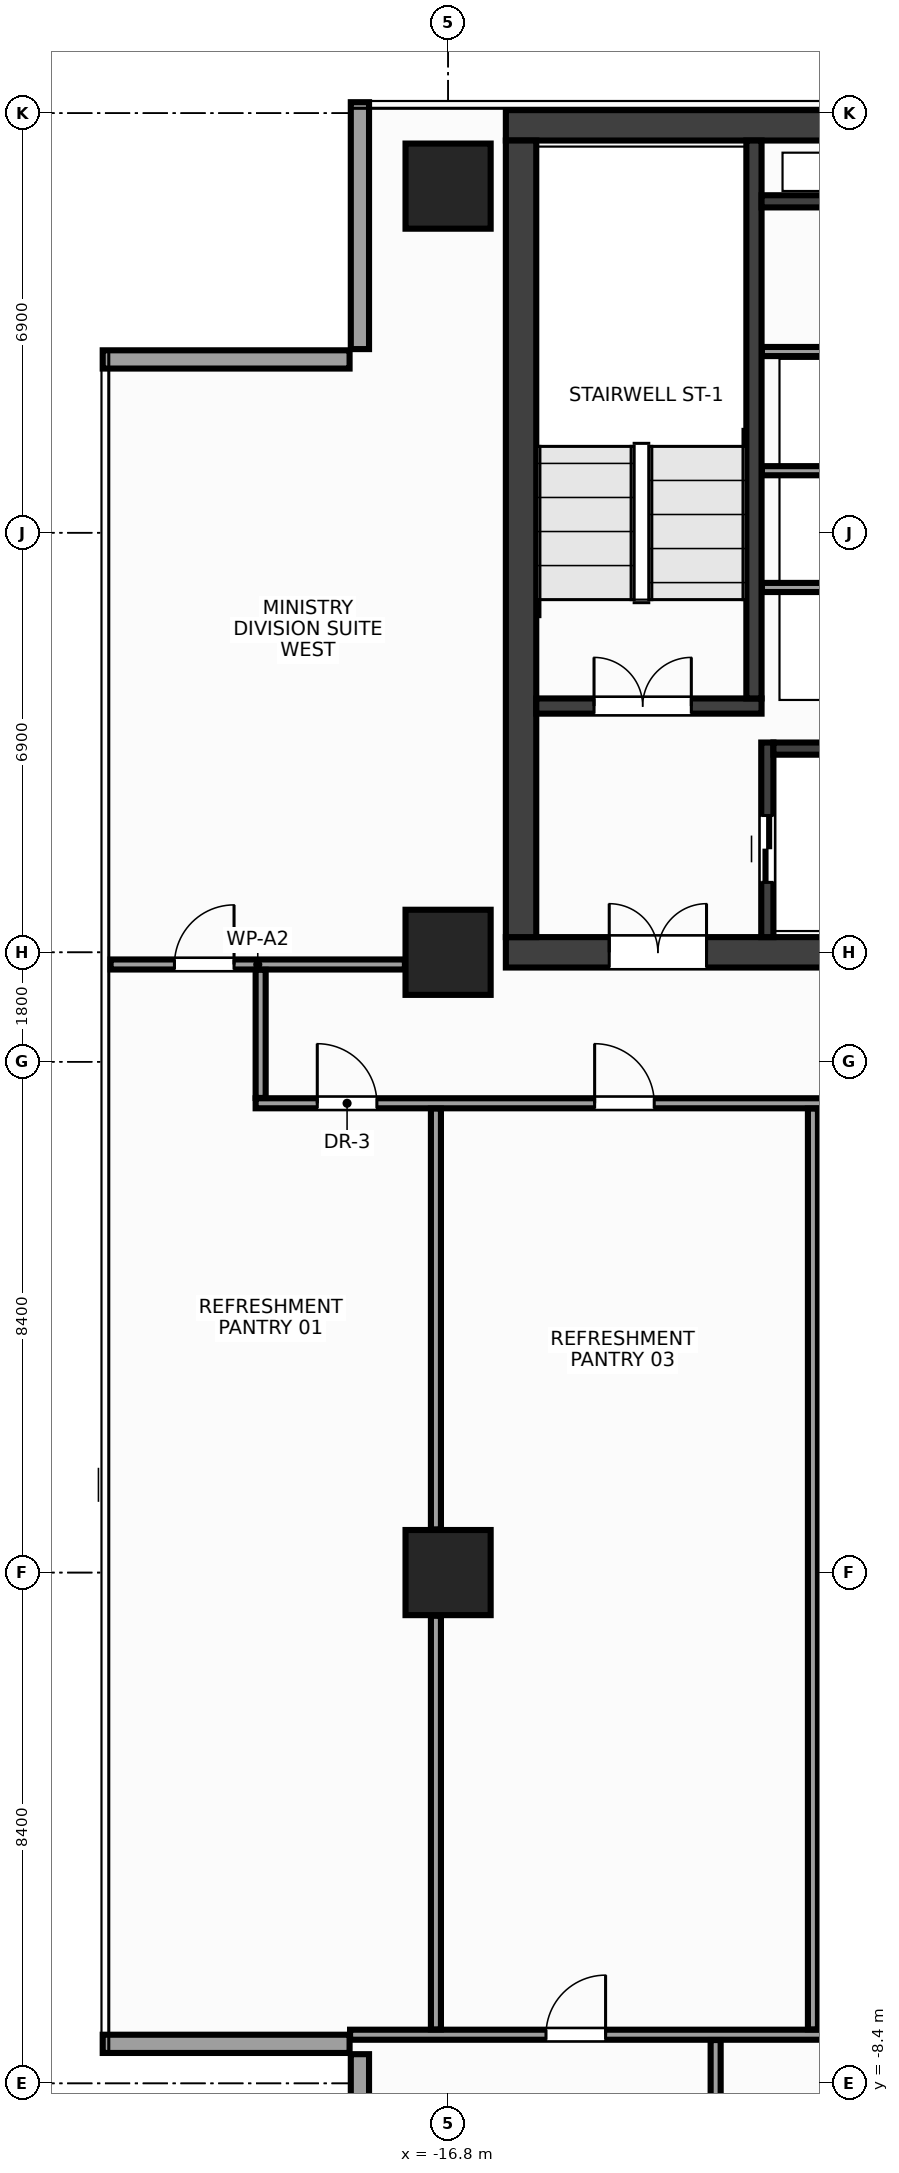
"""IFC4 building model, lengths in metres.
Left out: names, types, materials, properties, quantities, classifications, styles, units other than length and angle.
Written with IfcOpenShell. Run it as: python <this file> out.ifc"""

import sys

from ifc_helpers import new_model, si_unit, direction, frame, frame_2d, origin, origin_2d, place, context, subcontext, project, spatial, rectangle, extrude, source, transform, mapped, element, fill, save


model = new_model("IFC4")
c1 = context("Model", 3, precision=1e-05, world=origin(), true_north=direction((0.0, 1.0)))
c2 = subcontext(c1, "Body", "Model", "MODEL_VIEW")
j1 = project(units=[si_unit("LENGTHUNIT", "METRE"), si_unit("PLANEANGLEUNIT", "RADIAN")], contexts=[c1])
p1 = place(None, origin())
s1 = spatial("IfcSite", under=j1, at=p1, CompositionType="ELEMENT")
p2 = place(p1, origin())
s2 = spatial("IfcBuilding", under=s1, at=p2, CompositionType="ELEMENT")
p3 = place(p2, frame((0.0, 0.0, 261.2)))
s3 = spatial("IfcBuildingStorey", under=s2, at=p3, CompositionType="ELEMENT", Elevation=261.2)
m1 = source(origin(), c2, "Body", "SweptSolid", [
    extrude(rectangle(XDim=31.7, YDim=0.5, at=frame_2d((15.85, 0.0))), origin(), (0.0, 0.0, 1.0), 3.6),
])
p4 = place(p3, frame((-15.85, 23.8, 0.0), z_axis=(0.0, 0.0, 1.0), x_axis=(1.0, 0.0, 0.0)))
e1 = element("IfcWall", 1, at=p4, inside=s3, PredefinedType="SHEAR", context=c2, shape_type="MappedRepresentation", body=[
    mapped(m1, transform((0.0, 0.0, 0.0), x_axis=(1.0, 0.0, 0.0), y_axis=(0.0, 1.0, 0.0), z_axis=(0.0, 0.0, 1.0), scale=1.0)),
])
p5 = place(p3, frame((-15.85, 10.2, 0.0), z_axis=(0.0, 0.0, 1.0), x_axis=(1.0, 0.0, 0.0)))
e2 = element("IfcWall", 2, at=p5, inside=s3, PredefinedType="SHEAR", context=c2, shape_type="MappedRepresentation", body=[
    mapped(m1, transform((0.0, 0.0, 0.0), x_axis=(1.0, 0.0, 0.0), y_axis=(0.0, 1.0, 0.0), z_axis=(0.0, 0.0, 1.0), scale=1.0)),
])
p6 = place(p5, frame((1.7, 0.0, 0.0)))
e3 = element("IfcOpeningElement", 3, at=p6, cuts=e2, PredefinedType="OPENING", context=c2, shape_type="SweptSolid", body=[
    extrude(rectangle(XDim=1.6, YDim=2.15, at=frame_2d((0.8, 1.075))), frame((0.0, 0.262, 0.0), z_axis=(0.0, -1.0, 0.0), x_axis=(1.0, 0.0, 0.0)), (0.0, 0.0, 1.0), 0.524),
])
p7 = place(p5, frame((28.4, 0.0, 0.0)))
e4 = element("IfcOpeningElement", 4, at=p7, cuts=e2, PredefinedType="OPENING", context=c2, shape_type="SweptSolid", body=[
    extrude(rectangle(XDim=1.6, YDim=2.15, at=frame_2d((0.8, 1.075))), frame((0.0, 0.262, 0.0), z_axis=(0.0, -1.0, 0.0), x_axis=(1.0, 0.0, 0.0)), (0.0, 0.0, 1.0), 0.524),
])
p8 = place(p5, frame((15.1, 0.0, 0.0)))
e5 = element("IfcOpeningElement", 5, at=p8, cuts=e2, PredefinedType="OPENING", context=c2, shape_type="SweptSolid", body=[
    extrude(rectangle(XDim=1.5, YDim=2.2, at=frame_2d((0.75, 1.1))), frame((0.0, 0.262, 0.0), z_axis=(0.0, -1.0, 0.0), x_axis=(1.0, 0.0, 0.0)), (0.0, 0.0, 1.0), 0.524),
])
m2 = source(origin(), c2, "Body", "SweptSolid", [
    extrude(rectangle(XDim=13.1, YDim=0.5, at=frame_2d((6.55, 0.0))), origin(), (0.0, 0.0, 1.0), 3.6),
])
p9 = place(p3, frame((-15.6, 10.45, 0.0), z_axis=(0.0, 0.0, 1.0), x_axis=(0.0, 1.0, 0.0)))
e6 = element("IfcWall", 6, at=p9, inside=s3, PredefinedType="SHEAR", context=c2, shape_type="MappedRepresentation", body=[
    mapped(m2, transform((0.0, 0.0, 0.0), x_axis=(1.0, 0.0, 0.0), y_axis=(0.0, 1.0, 0.0), z_axis=(0.0, 0.0, 1.0), scale=1.0)),
])
m3 = source(origin(), c2, "Body", "SweptSolid", [
    extrude(rectangle(XDim=3.705, YDim=0.25, at=frame_2d((1.853, 0.0))), origin(), (0.0, 0.0, 1.0), 3.6),
])
p10 = place(p3, frame((-15.35, 14.25, 0.0), z_axis=(0.0, 0.0, 1.0), x_axis=(1.0, 0.0, 0.0)))
e7 = element("IfcWall", 7, at=p10, inside=s3, PredefinedType="SHEAR", context=c2, shape_type="MappedRepresentation", body=[
    mapped(m3, transform((0.0, 0.0, 0.0), x_axis=(1.0, 0.0, 0.0), y_axis=(0.0, 1.0, 0.0), z_axis=(0.0, 0.0, 1.0), scale=1.0)),
])
p11 = place(p10, frame((0.95, 0.0, 0.0)))
e8 = element("IfcOpeningElement", 8, at=p11, cuts=e7, PredefinedType="OPENING", context=c2, shape_type="SweptSolid", body=[
    extrude(rectangle(XDim=1.6, YDim=2.15, at=frame_2d((0.8, 1.075))), frame((0.0, 0.137, 0.0), z_axis=(0.0, -1.0, 0.0), x_axis=(1.0, 0.0, 0.0)), (0.0, 0.0, 1.0), 0.274),
])
m4 = source(origin(), c2, "Body", "SweptSolid", [
    extrude(rectangle(XDim=9.175, YDim=0.25, at=frame_2d((4.587, 0.0))), origin(), (0.0, 0.0, 1.0), 3.6),
])
p12 = place(p3, frame((-11.77, 14.375, 0.0), z_axis=(0.0, 0.0, 1.0), x_axis=(0.0, 1.0, 0.0)))
e9 = element("IfcWall", 9, at=p12, inside=s3, PredefinedType="SHEAR", context=c2, shape_type="MappedRepresentation", body=[
    mapped(m4, transform((0.0, 0.0, 0.0), x_axis=(1.0, 0.0, 0.0), y_axis=(0.0, 1.0, 0.0), z_axis=(0.0, 0.0, 1.0), scale=1.0)),
])
m5 = source(origin(), c2, "Body", "SweptSolid", [
    extrude(rectangle(XDim=3.2, YDim=0.2, at=frame_2d((1.6, 0.0))), origin(), (0.0, 0.0, 1.0), 3.6),
])
p13 = place(p3, frame((-11.55, 10.45, 0.0), z_axis=(0.0, 0.0, 1.0), x_axis=(0.0, 1.0, 0.0)))
e10 = element("IfcWall", 10, at=p13, inside=s3, PredefinedType="SHEAR", context=c2, shape_type="MappedRepresentation", body=[
    mapped(m5, transform((0.0, 0.0, 0.0), x_axis=(1.0, 0.0, 0.0), y_axis=(0.0, 1.0, 0.0), z_axis=(0.0, 0.0, 1.0), scale=1.0)),
])
p14 = place(p13, frame((0.9, 0.0, 0.0)))
e11 = element("IfcOpeningElement", 11, at=p14, cuts=e10, PredefinedType="OPENING", context=c2, shape_type="SweptSolid", body=[
    extrude(rectangle(XDim=1.1, YDim=2.15, at=frame_2d((0.55, 1.075))), frame((0.0, 0.112, 0.0), z_axis=(0.0, -1.0, 0.0), x_axis=(1.0, 0.0, 0.0)), (0.0, 0.0, 1.0), 0.224),
])
m6 = source(origin(), c2, "Body", "SweptSolid", [
    extrude(rectangle(XDim=2.825, YDim=0.2, at=frame_2d((1.413, 0.0))), origin(), (0.0, 0.0, 1.0), 3.6),
])
p15 = place(p3, frame((-11.45, 13.55, 0.0), z_axis=(0.0, 0.0, 1.0), x_axis=(1.0, 0.0, 0.0)))
e12 = element("IfcWall", 12, at=p15, inside=s3, PredefinedType="SHEAR", context=c2, shape_type="MappedRepresentation", body=[
    mapped(m6, transform((0.0, 0.0, 0.0), x_axis=(1.0, 0.0, 0.0), y_axis=(0.0, 1.0, 0.0), z_axis=(0.0, 0.0, 1.0), scale=1.0)),
])
m7 = source(origin(), c2, "Body", "SweptSolid", [
    extrude(rectangle(XDim=3.02, YDim=0.2, at=frame_2d((1.51, 0.0))), origin(), (0.0, 0.0, 1.0), 3.6),
])
p16 = place(p3, frame((-11.645, 22.55, 0.0), z_axis=(0.0, 0.0, 1.0), x_axis=(1.0, 0.0, 0.0)))
e13 = element("IfcWall", 13, at=p16, inside=s3, PredefinedType="SHEAR", context=c2, shape_type="MappedRepresentation", body=[
    mapped(m7, transform((0.0, 0.0, 0.0), x_axis=(1.0, 0.0, 0.0), y_axis=(0.0, 1.0, 0.0), z_axis=(0.0, 0.0, 1.0), scale=1.0)),
])
m8 = source(origin(), c2, "Body", "SweptSolid", [
    extrude(rectangle(XDim=1.4, YDim=1.4, at=origin_2d()), origin(), (0.0, 0.0, 1.0), 3.6),
])
for number, where, z_axis, x_axis in (
    (14, (-16.8, 0.0, 0.0), (0.0, 0.0, 1.0), (1.0, 0.0, 0.0)),
    (15, (-16.8, 10.2, 0.0), (0.0, 0.0, 1.0), (1.0, 0.0, 0.0)),
    (16, (-16.8, 22.8, 0.0), (0.0, 0.0, 1.0), (1.0, 0.0, 0.0)),
):
    element("IfcColumn", number, at=place(p3, frame(where, z_axis=z_axis, x_axis=x_axis)), inside=s3, PredefinedType="COLUMN", context=c2, shape_type="MappedRepresentation", body=[
        mapped(m8, transform((0.0, 0.0, 0.0), x_axis=(1.0, 0.0, 0.0), y_axis=(0.0, 1.0, 0.0), z_axis=(0.0, 0.0, 1.0), scale=1.0)),
    ])
m9 = source(origin(), c2, "Body", "SweptSolid", [
    extrude(rectangle(XDim=4.06, YDim=0.3, at=frame_2d((2.03, 0.0))), origin(), (0.0, 0.0, 1.0), 2.75),
])
p17 = place(p3, frame((-18.25, 24.18, 0.0), z_axis=(0.0, 0.0, 1.0), x_axis=(0.0, -1.0, 0.0)))
e17 = element("IfcWall", 17, at=p17, inside=s3, PredefinedType="STANDARD", context=c2, shape_type="MappedRepresentation", body=[
    mapped(m9, transform((0.0, 0.0, 0.0), x_axis=(1.0, 0.0, 0.0), y_axis=(0.0, 1.0, 0.0), z_axis=(0.0, 0.0, 1.0), scale=1.0)),
])
m10 = source(origin(), c2, "Body", "SweptSolid", [
    extrude(rectangle(XDim=4.06, YDim=0.3, at=frame_2d((2.03, 0.0))), origin(), (0.0, 0.0, 1.0), 2.75),
])
for number, where, z_axis, x_axis in (
    (18, (-18.42, 19.95, 0.0), (0.0, 0.0, 1.0), (-1.0, 0.0, 0.0)),
    (19, (-22.48, -7.75, 0.0), (0.0, 0.0, 1.0), (1.0, 0.0, 0.0)),
    (20, (-18.25, -7.92, 0.0), (0.0, 0.0, 1.0), (0.0, -1.0, 0.0)),
):
    element("IfcWall", number, at=place(p3, frame(where, z_axis=z_axis, x_axis=x_axis)), inside=s3, PredefinedType="STANDARD", context=c2, shape_type="MappedRepresentation", body=[
        mapped(m10, transform((0.0, 0.0, 0.0), x_axis=(1.0, 0.0, 0.0), y_axis=(0.0, 1.0, 0.0), z_axis=(0.0, 0.0, 1.0), scale=1.0)),
    ])
m11 = source(origin(), c2, "Body", "SweptSolid", [
    extrude(rectangle(XDim=3.01, YDim=0.15, at=frame_2d((1.505, 0.0))), origin(), (0.0, 0.0, 1.0), 3.37),
])
for number, where, z_axis, x_axis in (
    (21, (-11.64, 16.2, 0.0), (0.0, 0.0, 1.0), (1.0, 0.0, 0.0)),
    (22, (-11.64, 18.12, 0.0), (0.0, 0.0, 1.0), (1.0, 0.0, 0.0)),
    (23, (-11.64, 20.08, 0.0), (0.0, 0.0, 1.0), (1.0, 0.0, 0.0)),
):
    element("IfcWall", number, at=place(p3, frame(where, z_axis=z_axis, x_axis=x_axis)), inside=s3, PredefinedType="PARTITIONING", context=c2, shape_type="MappedRepresentation", body=[
        mapped(m11, transform((0.0, 0.0, 0.0), x_axis=(1.0, 0.0, 0.0), y_axis=(0.0, 1.0, 0.0), z_axis=(0.0, 0.0, 1.0), scale=1.0)),
    ])
m12 = source(origin(), c2, "Body", "SweptSolid", [
    extrude(rectangle(XDim=4.84, YDim=0.165, at=frame_2d((2.42, 0.0))), origin(), (0.0, 0.0, 1.0), 3.37),
])
p18 = place(p3, frame((-22.35, 10.0, 0.0), z_axis=(0.0, 0.0, 1.0), x_axis=(1.0, 0.0, 0.0)))
e24 = element("IfcWall", 24, at=p18, inside=s3, PredefinedType="PARTITIONING", context=c2, shape_type="MappedRepresentation", body=[
    mapped(m12, transform((0.0, 0.0, 0.0), x_axis=(1.0, 0.0, 0.0), y_axis=(0.0, 1.0, 0.0), z_axis=(0.0, 0.0, 1.0), scale=1.0)),
])
p19 = place(p18, frame((1.05, 0.0, 0.0)))
e25 = element("IfcOpeningElement", 25, at=p19, cuts=e24, PredefinedType="OPENING", context=c2, shape_type="SweptSolid", body=[
    extrude(rectangle(XDim=0.98, YDim=2.15, at=frame_2d((0.49, 1.075))), frame((0.0, 0.094, 0.0), z_axis=(0.0, -1.0, 0.0), x_axis=(1.0, 0.0, 0.0)), (0.0, 0.0, 1.0), 0.189),
])
m13 = source(origin(), c2, "Body", "SweptSolid", [
    extrude(rectangle(XDim=15.6, YDim=0.165, at=frame_2d((7.8, 0.0))), origin(), (0.0, 0.0, 1.0), 2.755),
])
p20 = place(p3, frame((-19.965, 7.718, 0.0), z_axis=(0.0, 0.0, 1.0), x_axis=(1.0, 0.0, 0.0)))
e26 = element("IfcWall", 26, at=p20, inside=s3, PredefinedType="PARTITIONING", context=c2, shape_type="MappedRepresentation", body=[
    mapped(m13, transform((0.0, 0.0, 0.0), x_axis=(1.0, 0.0, 0.0), y_axis=(0.0, 1.0, 0.0), z_axis=(0.0, 0.0, 1.0), scale=1.0)),
])
p21 = place(p20, frame((1.014, 0.0, 0.0)))
e27 = element("IfcOpeningElement", 27, at=p21, cuts=e26, PredefinedType="OPENING", context=c2, shape_type="SweptSolid", body=[
    extrude(rectangle(XDim=0.98, YDim=2.15, at=frame_2d((0.49, 1.075))), frame((0.0, 0.094, 0.0), z_axis=(0.0, -1.0, 0.0), x_axis=(1.0, 0.0, 0.0)), (0.0, 0.0, 1.0), 0.189),
])
p22 = place(p20, frame((5.575, 0.0, 0.0)))
e28 = element("IfcOpeningElement", 28, at=p22, cuts=e26, PredefinedType="OPENING", context=c2, shape_type="SweptSolid", body=[
    extrude(rectangle(XDim=0.98, YDim=2.15, at=frame_2d((0.49, 1.075))), frame((0.0, 0.094, 0.0), z_axis=(0.0, -1.0, 0.0), x_axis=(1.0, 0.0, 0.0)), (0.0, 0.0, 1.0), 0.189),
])
p23 = place(p20, frame((11.874, 0.0, 0.0)))
e29 = element("IfcOpeningElement", 29, at=p23, cuts=e26, PredefinedType="OPENING", context=c2, shape_type="SweptSolid", body=[
    extrude(rectangle(XDim=0.98, YDim=2.15, at=frame_2d((0.49, 1.075))), frame((0.0, 0.094, 0.0), z_axis=(0.0, -1.0, 0.0), x_axis=(1.0, 0.0, 0.0)), (0.0, 0.0, 1.0), 0.189),
])
m14 = source(origin(), c2, "Body", "SweptSolid", [
    extrude(rectangle(XDim=2.108, YDim=0.165, at=frame_2d((1.054, 0.0))), origin(), (0.0, 0.0, 1.0), 3.37),
])
p24 = place(p3, frame((-19.883, 7.805, 0.0), z_axis=(0.0, 0.0, 1.0), x_axis=(0.0, 1.0, 0.0)))
e30 = element("IfcWall", 30, at=p24, inside=s3, PredefinedType="PARTITIONING", context=c2, shape_type="MappedRepresentation", body=[
    mapped(m14, transform((0.0, 0.0, 0.0), x_axis=(1.0, 0.0, 0.0), y_axis=(0.0, 1.0, 0.0), z_axis=(0.0, 0.0, 1.0), scale=1.0)),
])
m15 = source(origin(), c2, "Body", "SweptSolid", [
    extrude(rectangle(XDim=36.824, YDim=0.165, at=frame_2d((18.412, 0.0))), origin(), (0.0, 0.0, 1.0), 2.755),
])
p25 = place(p3, frame((-18.412, -7.6, 0.0), z_axis=(0.0, 0.0, 1.0), x_axis=(1.0, 0.0, 0.0)))
e31 = element("IfcWall", 31, at=p25, inside=s3, PredefinedType="PARTITIONING", context=c2, shape_type="MappedRepresentation", body=[
    mapped(m15, transform((0.0, 0.0, 0.0), x_axis=(1.0, 0.0, 0.0), y_axis=(0.0, 1.0, 0.0), z_axis=(0.0, 0.0, 1.0), scale=1.0)),
])
p26 = place(p25, frame((3.222, 0.0, 0.0)))
e32 = element("IfcOpeningElement", 32, at=p26, cuts=e31, PredefinedType="OPENING", context=c2, shape_type="SweptSolid", body=[
    extrude(rectangle(XDim=0.98, YDim=2.15, at=frame_2d((0.49, 1.075))), frame((0.0, 0.094, 0.0), z_axis=(0.0, -1.0, 0.0), x_axis=(1.0, 0.0, 0.0)), (0.0, 0.0, 1.0), 0.189),
])
p27 = place(p25, frame((32.522, 0.0, 0.0)))
e33 = element("IfcOpeningElement", 33, at=p27, cuts=e31, PredefinedType="OPENING", context=c2, shape_type="SweptSolid", body=[
    extrude(rectangle(XDim=0.98, YDim=2.15, at=frame_2d((0.49, 1.075))), frame((0.0, 0.094, 0.0), z_axis=(0.0, -1.0, 0.0), x_axis=(1.0, 0.0, 0.0)), (0.0, 0.0, 1.0), 0.189),
])
p28 = place(p25, frame((9.922, 0.0, 0.0)))
e34 = element("IfcOpeningElement", 34, at=p28, cuts=e31, PredefinedType="OPENING", context=c2, shape_type="SweptSolid", body=[
    extrude(rectangle(XDim=0.98, YDim=2.15, at=frame_2d((0.49, 1.075))), frame((0.0, 0.094, 0.0), z_axis=(0.0, -1.0, 0.0), x_axis=(1.0, 0.0, 0.0)), (0.0, 0.0, 1.0), 0.189),
])
p29 = place(p25, frame((17.122, 0.0, 0.0)))
e35 = element("IfcOpeningElement", 35, at=p29, cuts=e31, PredefinedType="OPENING", context=c2, shape_type="SweptSolid", body=[
    extrude(rectangle(XDim=0.98, YDim=2.15, at=frame_2d((0.49, 1.075))), frame((0.0, 0.094, 0.0), z_axis=(0.0, -1.0, 0.0), x_axis=(1.0, 0.0, 0.0)), (0.0, 0.0, 1.0), 0.189),
])
p30 = place(p25, frame((25.122, 0.0, 0.0)))
e36 = element("IfcOpeningElement", 36, at=p30, cuts=e31, PredefinedType="OPENING", context=c2, shape_type="SweptSolid", body=[
    extrude(rectangle(XDim=0.98, YDim=2.15, at=frame_2d((0.49, 1.075))), frame((0.0, 0.094, 0.0), z_axis=(0.0, -1.0, 0.0), x_axis=(1.0, 0.0, 0.0)), (0.0, 0.0, 1.0), 0.189),
])
m16 = source(origin(), c2, "Body", "SweptSolid", [
    extrude(rectangle(XDim=6.802, YDim=0.165, at=frame_2d((3.401, 0.0))), origin(), (0.0, 0.0, 1.0), 2.755),
])
p31 = place(p3, frame((-17.0, -7.512, 0.0), z_axis=(0.0, 0.0, 1.0), x_axis=(0.0, 1.0, 0.0)))
e37 = element("IfcWall", 37, at=p31, inside=s3, PredefinedType="PARTITIONING", context=c2, shape_type="MappedRepresentation", body=[
    mapped(m16, transform((0.0, 0.0, 0.0), x_axis=(1.0, 0.0, 0.0), y_axis=(0.0, 1.0, 0.0), z_axis=(0.0, 0.0, 1.0), scale=1.0)),
])
m17 = source(origin(), c2, "Body", "SweptSolid", [
    extrude(rectangle(XDim=6.92, YDim=0.165, at=frame_2d((3.46, 0.0))), origin(), (0.0, 0.0, 1.0), 2.755),
])
p32 = place(p3, frame((-17.0, 0.71, 0.0), z_axis=(0.0, 0.0, 1.0), x_axis=(0.0, 1.0, 0.0)))
e38 = element("IfcWall", 38, at=p32, inside=s3, PredefinedType="PARTITIONING", context=c2, shape_type="MappedRepresentation", body=[
    mapped(m17, transform((0.0, 0.0, 0.0), x_axis=(1.0, 0.0, 0.0), y_axis=(0.0, 1.0, 0.0), z_axis=(0.0, 0.0, 1.0), scale=1.0)),
])
m18 = source(origin(), c2, "Body", "SweptSolid", [
    extrude(rectangle(XDim=15.142, YDim=0.165, at=frame_2d((7.571, 0.0))), origin(), (0.0, 0.0, 1.0), 2.655),
])
p33 = place(p3, frame((-10.8, -7.512, 0.0), z_axis=(0.0, 0.0, 1.0), x_axis=(0.0, 1.0, 0.0)))
e39 = element("IfcWall", 39, at=p33, inside=s3, PredefinedType="PARTITIONING", context=c2, shape_type="MappedRepresentation", body=[
    mapped(m18, transform((0.0, 0.0, 0.0), x_axis=(1.0, 0.0, 0.0), y_axis=(0.0, 1.0, 0.0), z_axis=(0.0, 0.0, 1.0), scale=1.0)),
])
m19 = source(origin(), c2, "Body", "SweptSolid", [
    extrude(rectangle(XDim=4.163, YDim=0.165, at=frame_2d((2.081, 0.0))), origin(), (0.0, 0.0, 1.0), 2.905),
])
p34 = place(p3, frame((-12.4, -11.85, 0.0), z_axis=(0.0, 0.0, 1.0), x_axis=(0.0, 1.0, 0.0)))
e40 = element("IfcWall", 40, at=p34, inside=s3, PredefinedType="PARTITIONING", context=c2, shape_type="MappedRepresentation", body=[
    mapped(m19, transform((0.0, 0.0, 0.0), x_axis=(1.0, 0.0, 0.0), y_axis=(0.0, 1.0, 0.0), z_axis=(0.0, 0.0, 1.0), scale=1.0)),
])
m20 = source(origin(), c2, "Body", "SweptSolid", [
    extrude(rectangle(XDim=1.6, YDim=2.15, at=frame_2d((0.8, 1.075))), frame((0.0, 0.025, 0.0), z_axis=(0.0, -1.0, 0.0), x_axis=(1.0, 0.0, 0.0)), (0.0, 0.0, 1.0), 0.05),
])
p35 = place(p11, origin())
e41 = element("IfcDoor", 41, at=p35, inside=s3, OperationType="DOUBLE_DOOR_SINGLE_SWING", PredefinedType="DOOR", context=c2, shape_type="MappedRepresentation", body=[
    mapped(m20, transform((0.0, 0.0, 0.0), x_axis=(1.0, 0.0, 0.0), y_axis=(0.0, 1.0, 0.0), z_axis=(0.0, 0.0, 1.0), scale=1.0)),
])
fill(e8, e41)
p36 = place(p6, origin())
e42 = element("IfcDoor", 42, at=p36, inside=s3, OperationType="DOUBLE_DOOR_SINGLE_SWING", PredefinedType="DOOR", context=c2, shape_type="MappedRepresentation", body=[
    mapped(m20, transform((0.0, 0.0, 0.0), x_axis=(1.0, 0.0, 0.0), y_axis=(0.0, 1.0, 0.0), z_axis=(0.0, 0.0, 1.0), scale=1.0)),
])
fill(e3, e42)
m21 = source(origin(), c2, "Body", "SweptSolid", [
    extrude(rectangle(XDim=1.1, YDim=2.15, at=frame_2d((0.55, 1.075))), frame((0.0, 0.025, 0.0), z_axis=(0.0, -1.0, 0.0), x_axis=(1.0, 0.0, 0.0)), (0.0, 0.0, 1.0), 0.05),
])
p37 = place(p14, origin())
e43 = element("IfcDoor", 43, at=p37, inside=s3, OperationType="DOUBLE_DOOR_SLIDING", PredefinedType="DOOR", context=c2, shape_type="MappedRepresentation", body=[
    mapped(m21, transform((0.0, 0.0, 0.0), x_axis=(1.0, 0.0, 0.0), y_axis=(0.0, 1.0, 0.0), z_axis=(0.0, 0.0, 1.0), scale=1.0)),
])
fill(e11, e43)
m22 = source(origin(), c2, "Body", "SweptSolid", [
    extrude(rectangle(XDim=0.98, YDim=2.15, at=frame_2d((0.49, 1.075))), frame((0.0, 0.025, 0.0), z_axis=(0.0, -1.0, 0.0), x_axis=(1.0, 0.0, 0.0)), (0.0, 0.0, 1.0), 0.05),
])
p38 = place(p21, origin())
e44 = element("IfcDoor", 44, at=p38, inside=s3, OperationType="SINGLE_SWING_LEFT", PredefinedType="DOOR", context=c2, shape_type="MappedRepresentation", body=[
    mapped(m22, transform((0.0, 0.0, 0.0), x_axis=(1.0, 0.0, 0.0), y_axis=(0.0, 1.0, 0.0), z_axis=(0.0, 0.0, 1.0), scale=1.0)),
])
fill(e27, e44)
p39 = place(p22, origin())
e45 = element("IfcDoor", 45, at=p39, inside=s3, OperationType="SINGLE_SWING_LEFT", PredefinedType="DOOR", context=c2, shape_type="MappedRepresentation", body=[
    mapped(m22, transform((0.0, 0.0, 0.0), x_axis=(1.0, 0.0, 0.0), y_axis=(0.0, 1.0, 0.0), z_axis=(0.0, 0.0, 1.0), scale=1.0)),
])
fill(e28, e45)
p40 = place(p19, origin())
e46 = element("IfcDoor", 46, at=p40, inside=s3, OperationType="SINGLE_SWING_RIGHT", PredefinedType="DOOR", context=c2, shape_type="MappedRepresentation", body=[
    mapped(m22, transform((0.0, 0.0, 0.0), x_axis=(1.0, 0.0, 0.0), y_axis=(0.0, 1.0, 0.0), z_axis=(0.0, 0.0, 1.0), scale=1.0)),
])
fill(e25, e46)
p41 = place(p26, origin())
e47 = element("IfcDoor", 47, at=p41, inside=s3, OperationType="SINGLE_SWING_RIGHT", PredefinedType="DOOR", context=c2, shape_type="MappedRepresentation", body=[
    mapped(m22, transform((0.0, 0.0, 0.0), x_axis=(1.0, 0.0, 0.0), y_axis=(0.0, 1.0, 0.0), z_axis=(0.0, 0.0, 1.0), scale=1.0)),
])
fill(e32, e47)
save(model, sys.argv[1])
